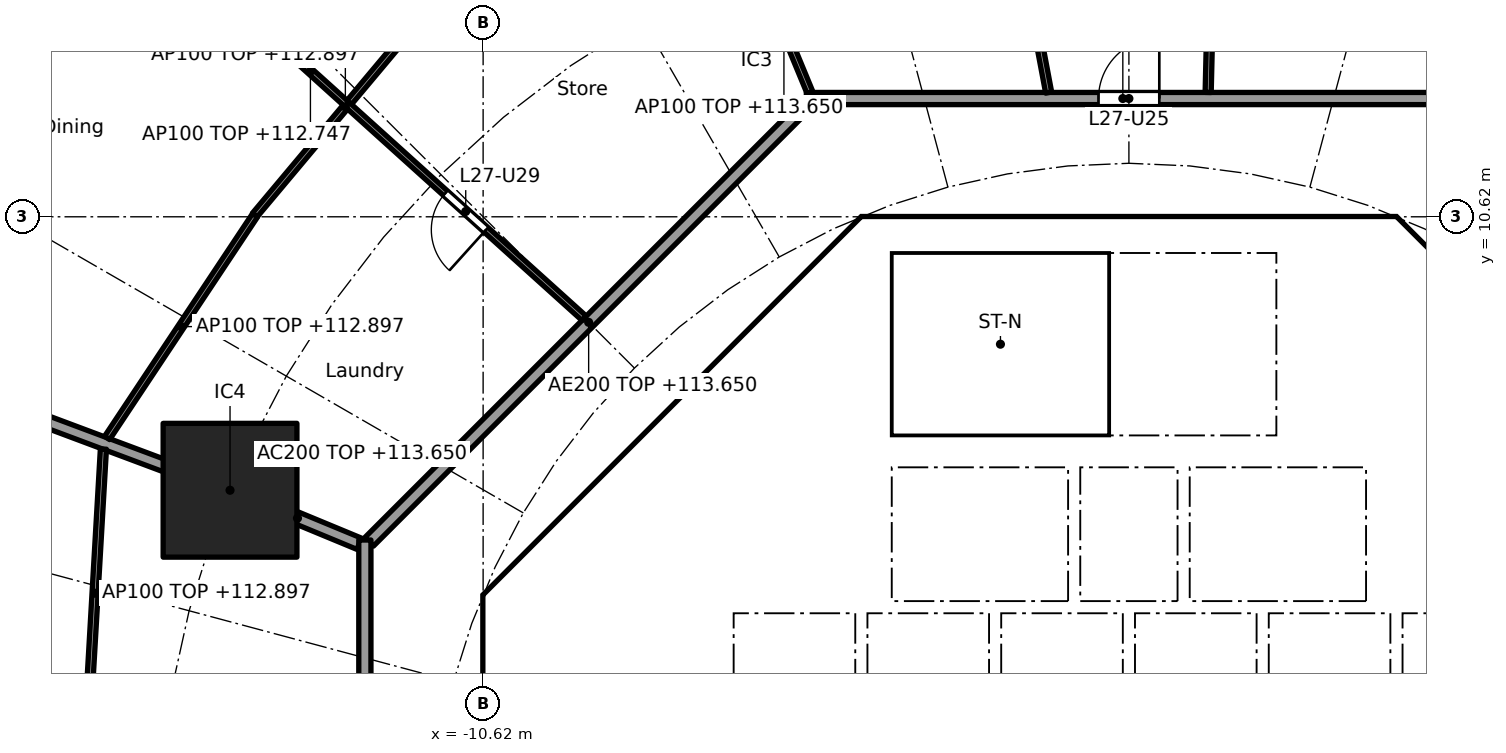
"""IFC4 building model, lengths in metres.
Left out: names, types, materials, properties, quantities, classifications, styles, units other than length and angle.
Written with IfcOpenShell. Run it as: python <this file> out.ifc"""

import sys

from ifc_helpers import new_model, si_unit, direction, frame, frame_2d, origin, origin_2d, place, context, subcontext, project, spatial, polyline, rectangle, outline, extrude, element, fill, save


model = new_model("IFC4")
c1 = context("Model", 3, precision=1e-05, world=origin(), true_north=direction((0.0, 1.0)))
c2 = subcontext(c1, "Body", "Model", "MODEL_VIEW")
j1 = project(units=[si_unit("LENGTHUNIT", "METRE"), si_unit("PLANEANGLEUNIT", "RADIAN")], contexts=[c1])
p1 = place(None, origin())
s1 = spatial("IfcSite", under=j1, at=p1, CompositionType="ELEMENT")
p2 = place(p1, origin())
s2 = spatial("IfcBuilding", under=s1, at=p2, CompositionType="ELEMENT")
p3 = place(p2, frame((0.0, 0.0, 110.3)))
s3 = spatial("IfcBuildingStorey", under=s2, at=p3, CompositionType="ELEMENT", Elevation=110.3)
p4 = place(p3, frame((-14.782, 6.123, 0.0), z_axis=(0.0, 0.0, 1.0), x_axis=(1.0, 0.0, 0.0)))
e1 = element("IfcColumn", 1, at=p4, inside=s3, PredefinedType="COLUMN", context=c2, shape_type="SweptSolid", body=[
    extrude(rectangle(XDim=2.2, YDim=2.2, at=origin_2d()), origin(), (0.0, 0.0, 1.0), 3.7),
])
p5 = place(p3, frame((9.988, 4.613, 0.0), z_axis=(0.0, 0.0, 1.0), x_axis=(-0.707106781187, 0.707106781187, 0.0)))
e2 = element("IfcWall", 2, at=p5, inside=s3, PredefinedType="SHEAR", context=c2, shape_type="SweptSolid", body=[
    extrude(rectangle(XDim=7.602, YDim=0.6, at=frame_2d((3.801, 0.0))), origin(), (0.0, 0.0, 1.0), 3.35),
])
p6 = place(p5, frame((3.201, 0.0, 0.0)))
e3 = element("IfcOpeningElement", 3, at=p6, cuts=e2, PredefinedType="OPENING", context=c2, shape_type="SweptSolid", body=[
    extrude(rectangle(XDim=1.2, YDim=2.1, at=frame_2d((0.6, 1.05))), frame((0.0, 0.31, 0.0), z_axis=(0.0, -1.0, 0.0), x_axis=(1.0, 0.0, 0.0)), (0.0, 0.0, 1.0), 0.62),
])
p7 = place(p3, frame((-4.613, 9.988, 0.0), z_axis=(0.0, 0.0, 1.0), x_axis=(-0.707106781187, -0.707106781187, 0.0)))
e4 = element("IfcWall", 4, at=p7, inside=s3, PredefinedType="SHEAR", context=c2, shape_type="SweptSolid", body=[
    extrude(rectangle(XDim=7.602, YDim=0.6, at=frame_2d((3.801, 0.0))), origin(), (0.0, 0.0, 1.0), 3.35),
])
p8 = place(p7, frame((0.351, 0.0, 0.0)))
e5 = element("IfcOpeningElement", 5, at=p8, cuts=e4, PredefinedType="OPENING", context=c2, shape_type="SweptSolid", body=[
    extrude(rectangle(XDim=1.1, YDim=2.1, at=frame_2d((0.55, 1.05))), frame((0.0, 0.31, 0.0), z_axis=(0.0, -1.0, 0.0), x_axis=(1.0, 0.0, 0.0)), (0.0, 0.0, 1.0), 0.62),
])
p9 = place(p3, frame((-10.325, 3.801, 0.0), z_axis=(0.0, 0.0, 1.0), x_axis=(0.0, -1.0, 0.0)))
e6 = element("IfcWall", 6, at=p9, inside=s3, PredefinedType="SHEAR", context=c2, shape_type="SweptSolid", body=[
    extrude(rectangle(XDim=7.602, YDim=0.6, at=frame_2d((3.801, 0.0))), origin(), (0.0, 0.0, 1.0), 3.35),
])
p10 = place(p9, frame((0.651, 0.0, 0.0)))
e7 = element("IfcOpeningElement", 7, at=p10, cuts=e6, PredefinedType="OPENING", context=c2, shape_type="SweptSolid", body=[
    extrude(rectangle(XDim=1.5, YDim=2.1, at=frame_2d((0.75, 1.05))), frame((0.0, 0.31, 0.0), z_axis=(0.0, -1.0, 0.0), x_axis=(1.0, 0.0, 0.0)), (0.0, 0.0, 1.0), 0.62),
])
p11 = place(p9, frame((5.451, 0.0, 0.0)))
e8 = element("IfcOpeningElement", 8, at=p11, cuts=e6, PredefinedType="OPENING", context=c2, shape_type="SweptSolid", body=[
    extrude(rectangle(XDim=1.5, YDim=2.1, at=frame_2d((0.75, 1.05))), frame((0.0, 0.31, 0.0), z_axis=(0.0, -1.0, 0.0), x_axis=(1.0, 0.0, 0.0)), (0.0, 0.0, 1.0), 0.62),
])
p12 = place(p3, frame((-5.8, 4.3, 0.0), z_axis=(0.0, 0.0, 1.0), x_axis=(0.0, 1.0, 0.0)))
e9 = element("IfcWall", 9, at=p12, inside=s3, PredefinedType="PARTITIONING", context=c2, shape_type="SweptSolid", body=[
    extrude(rectangle(XDim=3.927, YDim=0.15, at=frame_2d((1.963, 0.0))), origin(), (0.0, 0.0, 1.0), 3.35),
])
p13 = place(p12, frame((0.413, 0.0, 0.0)))
e10 = element("IfcOpeningElement", 10, at=p13, cuts=e9, PredefinedType="OPENING", context=c2, shape_type="SweptSolid", body=[
    extrude(rectangle(XDim=0.9, YDim=2.1, at=frame_2d((0.45, 1.05))), frame((0.0, 0.085, 0.0), z_axis=(0.0, -1.0, 0.0), x_axis=(1.0, 0.0, 0.0)), (0.0, 0.0, 1.0), 0.17),
])
p14 = place(p12, frame((2.489, 0.0, 0.0)))
e11 = element("IfcOpeningElement", 11, at=p14, cuts=e9, PredefinedType="OPENING", context=c2, shape_type="SweptSolid", body=[
    extrude(rectangle(XDim=0.9, YDim=2.1, at=frame_2d((0.45, 1.05))), frame((0.0, 0.085, 0.0), z_axis=(0.0, -1.0, 0.0), x_axis=(1.0, 0.0, 0.0)), (0.0, 0.0, 1.0), 0.17),
])
p15 = place(p3, frame((4.0, 4.3, 0.0), z_axis=(0.0, 0.0, 1.0), x_axis=(0.0, 1.0, 0.0)))
e12 = element("IfcWall", 12, at=p15, inside=s3, PredefinedType="SOLIDWALL", context=c2, shape_type="SweptSolid", body=[
    extrude(rectangle(XDim=2.2, YDim=0.2, at=frame_2d((1.1, 0.0))), origin(), (0.0, 0.0, 1.0), 3.35),
])
p16 = place(p15, frame((0.55, 0.0, 0.0)))
e13 = element("IfcOpeningElement", 13, at=p16, cuts=e12, PredefinedType="OPENING", context=c2, shape_type="SweptSolid", body=[
    extrude(rectangle(XDim=1.1, YDim=2.1, at=frame_2d((0.55, 1.05))), frame((0.0, 0.11, 0.0), z_axis=(0.0, -1.0, 0.0), x_axis=(1.0, 0.0, 0.0)), (0.0, 0.0, 1.0), 0.22),
])
p17 = place(p3, frame((-4.0, 4.3, 0.0), z_axis=(0.0, 0.0, 1.0), x_axis=(0.0, 1.0, 0.0)))
e14 = element("IfcWall", 14, at=p17, inside=s3, PredefinedType="SOLIDWALL", context=c2, shape_type="SweptSolid", body=[
    extrude(rectangle(XDim=2.2, YDim=0.2, at=frame_2d((1.1, 0.0))), origin(), (0.0, 0.0, 1.0), 3.35),
])
p18 = place(p17, frame((0.55, 0.0, 0.0)))
e15 = element("IfcOpeningElement", 15, at=p18, cuts=e14, PredefinedType="OPENING", context=c2, shape_type="SweptSolid", body=[
    extrude(rectangle(XDim=1.1, YDim=2.1, at=frame_2d((0.55, 1.05))), frame((0.0, 0.11, 0.0), z_axis=(0.0, -1.0, 0.0), x_axis=(1.0, 0.0, 0.0)), (0.0, 0.0, 1.0), 0.22),
])
p19 = place(p3, frame((4.0, 7.025, 0.0), z_axis=(0.0, 0.0, 1.0), x_axis=(0.0, 1.0, 0.0)))
e16 = element("IfcWall", 16, at=p19, inside=s3, PredefinedType="SOLIDWALL", context=c2, shape_type="SweptSolid", body=[
    extrude(rectangle(XDim=3.0, YDim=0.2, at=frame_2d((1.5, 0.0))), origin(), (0.0, 0.0, 1.0), 3.35),
])
p20 = place(p19, frame((0.925, 0.0, 0.0)))
e17 = element("IfcOpeningElement", 17, at=p20, cuts=e16, PredefinedType="OPENING", context=c2, shape_type="SweptSolid", body=[
    extrude(rectangle(XDim=1.1, YDim=2.1, at=frame_2d((0.55, 1.05))), frame((0.0, 0.11, 0.0), z_axis=(0.0, -1.0, 0.0), x_axis=(1.0, 0.0, 0.0)), (0.0, 0.0, 1.0), 0.22),
])
p21 = place(p3, origin())
e18 = element("IfcWall", 18, at=p21, inside=s3, PredefinedType="SHEAR", context=c2, shape_type="SweptSolid", body=[
    extrude(outline(polyline([(-10.2, 4.825), (-9.776, 4.401), (-10.025, 4.152), (-10.025, 3.801), (-10.625, 3.801), (-10.625, 4.401), (-10.2, 4.825)])), origin(), (0.0, 0.0, 1.0), 3.35),
])
p22 = place(p3, origin())
e19 = element("IfcWall", 19, at=p22, inside=s3, PredefinedType="SHEAR", context=c2, shape_type="SweptSolid", body=[
    extrude(outline(polyline([(-4.152, 10.025), (-4.401, 9.776), (-4.825, 10.2), (-4.401, 10.625), (4.401, 10.625), (4.825, 10.2), (4.401, 9.776), (4.152, 10.025), (-4.152, 10.025)])), origin(), (0.0, 0.0, 1.0), 3.35),
])
p23 = place(p3, frame((-10.025, 4.0, 0.0), z_axis=(0.0, 0.0, 1.0), x_axis=(1.0, 0.0, 0.0)))
e20 = element("IfcWall", 20, at=p23, inside=s3, PredefinedType="PARTITIONING", context=c2, shape_type="SweptSolid", body=[
    extrude(rectangle(XDim=3.325, YDim=0.2, at=frame_2d((1.662, 0.0))), origin(), (0.0, 0.0, 1.0), 3.35),
])
p24 = place(p3, frame((-8.001, 6.1, 0.0), z_axis=(0.0, 0.0, 1.0), x_axis=(1.0, 0.0, 0.0)))
e21 = element("IfcWall", 21, at=p24, inside=s3, PredefinedType="PARTITIONING", context=c2, shape_type="SweptSolid", body=[
    extrude(rectangle(XDim=2.126, YDim=0.15, at=frame_2d((1.063, 0.0))), origin(), (0.0, 0.0, 1.0), 3.35),
])
for number, where, z_axis, x_axis in (
    (22, (-0.9, 4.3, 0.0), (0.0, 0.0, 1.0), (0.0, 1.0, 0.0)),
    (23, (0.9, 4.3, 0.0), (0.0, 0.0, 1.0), (0.0, 1.0, 0.0)),
):
    element("IfcWall", number, at=place(p3, frame(where, z_axis=z_axis, x_axis=x_axis)), inside=s3, PredefinedType="SOLIDWALL", context=c2, shape_type="SweptSolid", body=[
        extrude(rectangle(XDim=2.2, YDim=0.2, at=frame_2d((1.1, 0.0))), origin(), (0.0, 0.0, 1.0), 3.35),
    ])
p25 = place(p3, origin())
e24 = element("IfcWall", 24, at=p25, inside=s3, PredefinedType="SOLIDWALL", context=c2, shape_type="SweptSolid", body=[
    extrude(outline(polyline([(-6.5, 2.1), (-6.7, 2.1), (-6.7, 4.3), (6.7, 4.3), (6.7, 2.1), (6.5, 2.1), (6.5, 4.1), (4.5, 4.1), (4.5, 2.1), (4.3, 2.1), (4.3, 4.1), (2.3, 4.1), (2.3, 2.1), (2.1, 2.1), (2.1, 4.1), (0.1, 4.1), (0.1, 2.1), (-0.1, 2.1), (-0.1, 4.1), (-2.1, 4.1), (-2.1, 2.1), (-2.3, 2.1), (-2.3, 4.1), (-4.3, 4.1), (-4.3, 2.1), (-4.5, 2.1), (-4.5, 4.1), (-6.5, 4.1), (-6.5, 2.1)])), origin(), (0.0, 0.0, 1.0), 3.35),
])
p26 = place(p3, origin())
e25 = element("IfcWall", 25, at=p26, inside=s3, PredefinedType="SOLIDWALL", context=c2, shape_type="SweptSolid", body=[
    extrude(outline(polyline([(-3.9, 7.025), (-4.1, 7.025), (-4.1, 10.025), (-3.9, 10.025), (-3.9, 7.025)])), origin(), (0.0, 0.0, 1.0), 3.35),
])
p27 = place(p3, origin())
e26 = element("IfcWall", 26, at=p27, inside=s3, PredefinedType="SOLIDWALL", context=c2, shape_type="SweptSolid", body=[
    extrude(outline(polyline([(4.1, 6.5), (-4.1, 6.5), (-4.1, 7.025), (4.1, 7.025), (4.1, 6.5)])), origin(), (0.0, 0.0, 1.0), 3.35),
])
p28 = place(p3, frame((-12.657, 5.243, 0.0), z_axis=(0.0, 0.0, 1.0), x_axis=(-0.923843626288, 0.382770106157, 0.0)))
e27 = element("IfcWall", 27, at=p28, inside=s3, PredefinedType="PARTITIONING", context=c2, shape_type="SweptSolid", body=[
    extrude(rectangle(XDim=2.199, YDim=0.2, at=frame_2d((1.1, 0.0))), origin(), (0.0, 0.0, 1.0), 3.35),
])
p29 = place(p3, frame((-14.829, 6.14, 0.0), z_axis=(0.0, 0.0, 1.0), x_axis=(-0.936597324342, 0.35040755134, 0.0)))
e28 = element("IfcWall", 28, at=p29, inside=s3, PredefinedType="PARTITIONING", context=c2, shape_type="SweptSolid", body=[
    extrude(rectangle(XDim=13.606, YDim=0.2, at=frame_2d((6.803, 0.0))), origin(), (0.0, 0.0, 1.0), 2.597),
])
p30 = place(p3, frame((5.104, 12.565, 0.0), z_axis=(0.0, 0.0, 1.0), x_axis=(-1.0, 0.0, 0.0)))
e29 = element("IfcWall", 29, at=p30, inside=s3, PredefinedType="PARTITIONING", context=c2, shape_type="SweptSolid", body=[
    extrude(rectangle(XDim=10.409, YDim=0.2, at=frame_2d((5.205, 0.0))), origin(), (0.0, 0.0, 1.0), 3.35),
])
p31 = place(p30, frame((4.604, 0.0, 0.0)))
e30 = element("IfcOpeningElement", 30, at=p31, cuts=e29, PredefinedType="OPENING", context=c2, shape_type="SweptSolid", body=[
    extrude(rectangle(XDim=1.0, YDim=2.1, at=frame_2d((0.5, 1.05))), frame((0.0, 0.11, 0.0), z_axis=(0.0, -1.0, 0.0), x_axis=(1.0, 0.0, 0.0)), (0.0, 0.0, 1.0), 0.22),
])
p32 = place(p3, frame((-5.275, 12.494, 0.0), z_axis=(0.0, 0.0, 1.0), x_axis=(-0.707106781187, -0.707106781187, 0.0)))
e31 = element("IfcWall", 31, at=p32, inside=s3, PredefinedType="PARTITIONING", context=c2, shape_type="SweptSolid", body=[
    extrude(rectangle(XDim=10.209, YDim=0.2, at=frame_2d((5.104, 0.0))), origin(), (0.0, 0.0, 1.0), 3.35),
])
p33 = place(p3, frame((-12.565, 5.304, 0.0), z_axis=(0.0, 0.0, 1.0), x_axis=(0.0, -1.0, 0.0)))
e32 = element("IfcWall", 32, at=p33, inside=s3, PredefinedType="PARTITIONING", context=c2, shape_type="SweptSolid", body=[
    extrude(rectangle(XDim=10.409, YDim=0.2, at=frame_2d((5.205, 0.0))), origin(), (0.0, 0.0, 1.0), 3.35),
])
p34 = place(p33, frame((6.539, 0.0, 0.0)))
e33 = element("IfcOpeningElement", 33, at=p34, cuts=e32, PredefinedType="OPENING", context=c2, shape_type="SweptSolid", body=[
    extrude(rectangle(XDim=1.0, YDim=2.1, at=frame_2d((0.5, 1.05))), frame((0.0, 0.11, 0.0), z_axis=(0.0, -1.0, 0.0), x_axis=(1.0, 0.0, 0.0)), (0.0, 0.0, 1.0), 0.22),
])
p35 = place(p3, frame((1.303, 12.665, 0.0), z_axis=(0.0, 0.0, 1.0), x_axis=(0.023564110689, 0.999722327793, 0.0)))
e34 = element("IfcWall", 34, at=p35, inside=s3, PredefinedType="PARTITIONING", context=c2, shape_type="SweptSolid", body=[
    extrude(rectangle(XDim=21.664, YDim=0.1, at=frame_2d((10.832, 0.0))), origin(), (0.0, 0.0, 1.0), 2.447),
])
p36 = place(p35, frame((2.407, 0.0, 0.0)))
e35 = element("IfcOpeningElement", 35, at=p36, cuts=e34, PredefinedType="OPENING", context=c2, shape_type="SweptSolid", body=[
    extrude(rectangle(XDim=0.9, YDim=2.1, at=frame_2d((0.45, 1.05))), frame((0.0, 0.06, 0.0), z_axis=(0.0, -1.0, 0.0), x_axis=(1.0, 0.0, 0.0)), (0.0, 0.0, 1.0), 0.12),
])
p37 = place(p35, frame((9.034, 0.0, 0.0)))
e36 = element("IfcOpeningElement", 36, at=p37, cuts=e34, PredefinedType="OPENING", context=c2, shape_type="SweptSolid", body=[
    extrude(rectangle(XDim=0.9, YDim=2.1, at=frame_2d((0.45, 1.05))), frame((0.0, 0.06, 0.0), z_axis=(0.0, -1.0, 0.0), x_axis=(1.0, 0.0, 0.0)), (0.0, 0.0, 1.0), 0.12),
])
p38 = place(p35, frame((17.009, 0.0, 0.0)))
e37 = element("IfcOpeningElement", 37, at=p38, cuts=e34, PredefinedType="OPENING", context=c2, shape_type="SweptSolid", body=[
    extrude(rectangle(XDim=0.9, YDim=2.1, at=frame_2d((0.45, 1.05))), frame((0.0, 0.06, 0.0), z_axis=(0.0, -1.0, 0.0), x_axis=(1.0, 0.0, 0.0)), (0.0, 0.0, 1.0), 0.12),
])
p39 = place(p3, frame((-1.32, 12.663, 0.0), z_axis=(0.0, 0.0, 1.0), x_axis=(-0.185450638662, 0.982653581187, 0.0)))
e38 = element("IfcWall", 38, at=p39, inside=s3, PredefinedType="PARTITIONING", context=c2, shape_type="SweptSolid", body=[
    extrude(rectangle(XDim=22.043, YDim=0.1, at=frame_2d((11.021, 0.0))), origin(), (0.0, 0.0, 1.0), 2.447),
])
p40 = place(p39, frame((2.458, 0.0, 0.0)))
e39 = element("IfcOpeningElement", 39, at=p40, cuts=e38, PredefinedType="OPENING", context=c2, shape_type="SweptSolid", body=[
    extrude(rectangle(XDim=0.9, YDim=2.1, at=frame_2d((0.45, 1.05))), frame((0.0, 0.06, 0.0), z_axis=(0.0, -1.0, 0.0), x_axis=(1.0, 0.0, 0.0)), (0.0, 0.0, 1.0), 0.12),
])
p41 = place(p39, frame((9.202, 0.0, 0.0)))
e40 = element("IfcOpeningElement", 40, at=p41, cuts=e38, PredefinedType="OPENING", context=c2, shape_type="SweptSolid", body=[
    extrude(rectangle(XDim=0.9, YDim=2.1, at=frame_2d((0.45, 1.05))), frame((0.0, 0.06, 0.0), z_axis=(0.0, -1.0, 0.0), x_axis=(1.0, 0.0, 0.0)), (0.0, 0.0, 1.0), 0.12),
])
p42 = place(p3, frame((-5.243, 12.657, 0.0), z_axis=(0.0, 0.0, 1.0), x_axis=(-0.382703272338, 0.923871314276, 0.0)))
e41 = element("IfcWall", 41, at=p42, inside=s3, PredefinedType="PARTITIONING", context=c2, shape_type="SweptSolid", body=[
    extrude(rectangle(XDim=2.249, YDim=0.1, at=frame_2d((1.125, 0.0))), origin(), (0.0, 0.0, 1.0), 3.35),
])
p43 = place(p3, frame((-11.396, 14.202, 0.0), z_axis=(0.0, 0.0, 1.0), x_axis=(-0.642475660273, -0.766306091557, 0.0)))
e42 = element("IfcWall", 42, at=p43, inside=s3, PredefinedType="PARTITIONING", context=c2, shape_type="SweptSolid", body=[
    extrude(rectangle(XDim=4.637, YDim=0.1, at=frame_2d((2.319, 0.0))), origin(), (0.0, 0.0, 1.0), 2.597),
])
p44 = place(p3, frame((-8.959, 8.952, 0.0), z_axis=(0.0, 0.0, 1.0), x_axis=(-0.742679904999, 0.669646592398, 0.0)))
e43 = element("IfcWall", 43, at=p44, inside=s3, PredefinedType="PARTITIONING", context=c2, shape_type="SweptSolid", body=[
    extrude(rectangle(XDim=12.121, YDim=0.1, at=frame_2d((6.061, 0.0))), origin(), (0.0, 0.0, 1.0), 2.447),
])
p45 = place(p44, frame((2.172, 0.0, 0.0)))
e44 = element("IfcOpeningElement", 44, at=p45, cuts=e43, PredefinedType="OPENING", context=c2, shape_type="SweptSolid", body=[
    extrude(rectangle(XDim=0.9, YDim=2.1, at=frame_2d((0.45, 1.05))), frame((0.0, 0.06, 0.0), z_axis=(0.0, -1.0, 0.0), x_axis=(1.0, 0.0, 0.0)), (0.0, 0.0, 1.0), 0.12),
])
p46 = place(p44, frame((8.233, 0.0, 0.0)))
e45 = element("IfcOpeningElement", 45, at=p46, cuts=e43, PredefinedType="OPENING", context=c2, shape_type="SweptSolid", body=[
    extrude(rectangle(XDim=0.9, YDim=2.1, at=frame_2d((0.45, 1.05))), frame((0.0, 0.06, 0.0), z_axis=(0.0, -1.0, 0.0), x_axis=(1.0, 0.0, 0.0)), (0.0, 0.0, 1.0), 0.12),
])
p47 = place(p3, frame((-14.371, 10.645, 0.0), z_axis=(0.0, 0.0, 1.0), x_axis=(-0.553341009285, -0.832954817168, 0.0)))
e46 = element("IfcWall", 46, at=p47, inside=s3, PredefinedType="PARTITIONING", context=c2, shape_type="SweptSolid", body=[
    extrude(rectangle(XDim=4.396, YDim=0.1, at=frame_2d((2.198, 0.0))), origin(), (0.0, 0.0, 1.0), 2.597),
])
p48 = place(p3, frame((-16.865, 6.8, 0.0), z_axis=(0.0, 0.0, 1.0), x_axis=(-0.05777584434, -0.998329580755, 0.0)))
e47 = element("IfcWall", 47, at=p48, inside=s3, PredefinedType="PARTITIONING", context=c2, shape_type="SweptSolid", body=[
    extrude(rectangle(XDim=4.75, YDim=0.1, at=frame_2d((2.375, 0.0))), origin(), (0.0, 0.0, 1.0), 2.597),
])
p49 = place(p16, origin())
e48 = element("IfcDoor", 48, at=p49, inside=s3, OperationType="DOUBLE_DOOR_SLIDING", PredefinedType="DOOR", context=c2, shape_type="SweptSolid", body=[
    extrude(rectangle(XDim=1.1, YDim=2.1, at=frame_2d((0.55, 1.05))), frame((0.0, 0.025, 0.0), z_axis=(0.0, -1.0, 0.0), x_axis=(1.0, 0.0, 0.0)), (0.0, 0.0, 1.0), 0.05),
])
fill(e13, e48)
p50 = place(p18, origin())
e49 = element("IfcDoor", 49, at=p50, inside=s3, OperationType="DOUBLE_DOOR_SLIDING", PredefinedType="DOOR", context=c2, shape_type="SweptSolid", body=[
    extrude(rectangle(XDim=1.1, YDim=2.1, at=frame_2d((0.55, 1.05))), frame((0.0, 0.025, 0.0), z_axis=(0.0, -1.0, 0.0), x_axis=(1.0, 0.0, 0.0)), (0.0, 0.0, 1.0), 0.05),
])
fill(e15, e49)
p51 = place(p20, origin())
e50 = element("IfcDoor", 50, at=p51, inside=s3, OperationType="SINGLE_SWING_RIGHT", PredefinedType="DOOR", context=c2, shape_type="SweptSolid", body=[
    extrude(rectangle(XDim=1.1, YDim=2.1, at=frame_2d((0.55, 1.05))), frame((0.0, 0.025, 0.0), z_axis=(0.0, -1.0, 0.0), x_axis=(1.0, 0.0, 0.0)), (0.0, 0.0, 1.0), 0.05),
])
fill(e17, e50)
p52 = place(p13, origin())
e51 = element("IfcDoor", 51, at=p52, inside=s3, OperationType="SINGLE_SWING_LEFT", PredefinedType="DOOR", context=c2, shape_type="SweptSolid", body=[
    extrude(rectangle(XDim=0.9, YDim=2.1, at=frame_2d((0.45, 1.05))), frame((0.0, 0.025, 0.0), z_axis=(0.0, -1.0, 0.0), x_axis=(1.0, 0.0, 0.0)), (0.0, 0.0, 1.0), 0.05),
])
fill(e10, e51)
p53 = place(p14, origin())
e52 = element("IfcDoor", 52, at=p53, inside=s3, OperationType="SINGLE_SWING_LEFT", PredefinedType="DOOR", context=c2, shape_type="SweptSolid", body=[
    extrude(rectangle(XDim=0.9, YDim=2.1, at=frame_2d((0.45, 1.05))), frame((0.0, 0.025, 0.0), z_axis=(0.0, -1.0, 0.0), x_axis=(1.0, 0.0, 0.0)), (0.0, 0.0, 1.0), 0.05),
])
fill(e11, e52)
p54 = place(p10, origin())
e53 = element("IfcDoor", 53, at=p54, inside=s3, OperationType="DOUBLE_DOOR_SINGLE_SWING", PredefinedType="DOOR", context=c2, shape_type="SweptSolid", body=[
    extrude(rectangle(XDim=1.5, YDim=2.1, at=frame_2d((0.75, 1.05))), frame((0.0, 0.025, 0.0), z_axis=(0.0, -1.0, 0.0), x_axis=(1.0, 0.0, 0.0)), (0.0, 0.0, 1.0), 0.05),
])
fill(e7, e53)
p55 = place(p8, origin())
e54 = element("IfcDoor", 54, at=p55, inside=s3, OperationType="SINGLE_SWING_RIGHT", PredefinedType="DOOR", context=c2, shape_type="SweptSolid", body=[
    extrude(rectangle(XDim=1.1, YDim=2.1, at=frame_2d((0.55, 1.05))), frame((0.0, 0.025, 0.0), z_axis=(0.0, -1.0, 0.0), x_axis=(1.0, 0.0, 0.0)), (0.0, 0.0, 1.0), 0.05),
])
fill(e5, e54)
p56 = place(p31, frame((1.0, 0.0, 0.0), x_axis=(-1.0, 0.0, 0.0)))
e55 = element("IfcDoor", 55, at=p56, inside=s3, OperationType="SINGLE_SWING_RIGHT", PredefinedType="DOOR", context=c2, shape_type="SweptSolid", body=[
    extrude(rectangle(XDim=1.0, YDim=2.1, at=frame_2d((0.5, 1.05))), frame((0.0, 0.025, 0.0), z_axis=(0.0, -1.0, 0.0), x_axis=(1.0, 0.0, 0.0)), (0.0, 0.0, 1.0), 0.05),
])
fill(e30, e55)
p57 = place(p45, origin())
e56 = element("IfcDoor", 56, at=p57, inside=s3, OperationType="SINGLE_SWING_LEFT", PredefinedType="DOOR", context=c2, shape_type="SweptSolid", body=[
    extrude(rectangle(XDim=0.9, YDim=2.1, at=frame_2d((0.45, 1.05))), frame((0.0, 0.025, 0.0), z_axis=(0.0, -1.0, 0.0), x_axis=(1.0, 0.0, 0.0)), (0.0, 0.0, 1.0), 0.05),
])
fill(e44, e56)
save(model, sys.argv[1])
